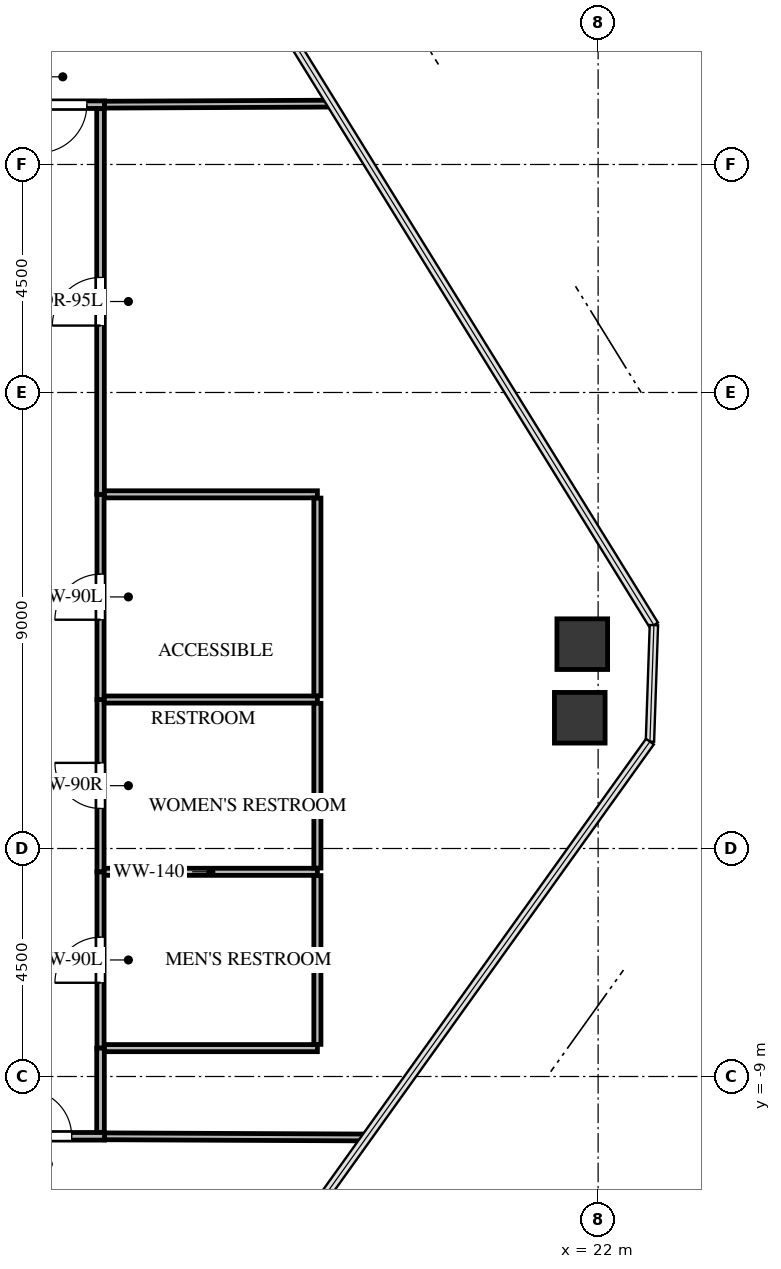
"""IFC4 building model, lengths in metres.
Left out: names, types, materials, properties, quantities, classifications, styles, units other than length and angle.
Written with IfcOpenShell. Run it as: python <this file> out.ifc"""

import sys

from ifc_helpers import new_model, si_unit, direction, frame, frame_2d, origin, origin_2d, place, context, subcontext, project, spatial, rectangle, extrude, source, transform, mapped, element, fill, save


model = new_model("IFC4")
c1 = context("Model", 3, precision=1e-05, world=origin(), true_north=direction((0.0, 1.0)))
c2 = subcontext(c1, "Body", "Model", "MODEL_VIEW")
j1 = project(units=[si_unit("LENGTHUNIT", "METRE"), si_unit("PLANEANGLEUNIT", "RADIAN")], contexts=[c1])
p1 = place(None, origin())
s1 = spatial("IfcSite", under=j1, at=p1, CompositionType="ELEMENT")
p2 = place(p1, origin())
s2 = spatial("IfcBuilding", under=s1, at=p2, CompositionType="ELEMENT")
p3 = place(p2, frame((0.0, 0.0, 177.1)))
s3 = spatial("IfcBuildingStorey", under=s2, at=p3, CompositionType="ELEMENT", Elevation=177.1)
m1 = source(origin(), c2, "Body", "SweptSolid", [
    extrude(rectangle(XDim=1.0, YDim=1.0, at=origin_2d()), origin(), (0.0, 0.0, 1.0), 3.3),
])
for number, where, z_axis, x_axis in (
    (1, (21.687, -0.467, -0.24), (0.0, 0.0, 1.0), (1.0, 0.0, 0.0)),
    (2, (21.638, -1.92, -0.24), (0.0, 0.0, 1.0), (1.0, 0.0, 0.0)),
):
    element("IfcColumn", number, at=place(p3, frame(where, z_axis=z_axis, x_axis=x_axis)), inside=s3, PredefinedType="COLUMN", context=c2, shape_type="MappedRepresentation", body=[
        mapped(m1, transform((0.0, 0.0, 0.0), x_axis=(1.0, 0.0, 0.0), y_axis=(0.0, 1.0, 0.0), z_axis=(0.0, 0.0, 1.0), scale=1.0)),
    ])
p4 = place(p3, frame((12.18, -8.44, 0.0), z_axis=(0.0, 0.0, 1.0), x_axis=(0.0, 1.0, 0.0)))
e3 = element("IfcWall", 3, at=p4, inside=s3, PredefinedType="PARTITIONING", context=c2, shape_type="SweptSolid", body=[
    extrude(rectangle(XDim=3.48, YDim=0.14, at=frame_2d((1.74, 0.0))), origin(), (0.0, 0.0, 1.0), 3.045),
])
p5 = place(p4, frame((1.29, 0.0, 0.0)))
e4 = element("IfcOpeningElement", 4, at=p5, cuts=e3, PredefinedType="OPENING", context=c2, shape_type="SweptSolid", body=[
    extrude(rectangle(XDim=0.9, YDim=2.05, at=frame_2d((0.45, 1.025))), frame((0.0, 0.08, 0.0), z_axis=(0.0, -1.0, 0.0), x_axis=(1.0, 0.0, 0.0)), (0.0, 0.0, 1.0), 0.16),
])
p6 = place(p3, frame((12.18, -4.96, 0.0), z_axis=(0.0, 0.0, 1.0), x_axis=(0.0, 1.0, 0.0)))
e5 = element("IfcWall", 5, at=p6, inside=s3, PredefinedType="PARTITIONING", context=c2, shape_type="SweptSolid", body=[
    extrude(rectangle(XDim=3.4, YDim=0.14, at=frame_2d((1.7, 0.0))), origin(), (0.0, 0.0, 1.0), 3.045),
])
p7 = place(p6, frame((1.25, 0.0, 0.0)))
e6 = element("IfcOpeningElement", 6, at=p7, cuts=e5, PredefinedType="OPENING", context=c2, shape_type="SweptSolid", body=[
    extrude(rectangle(XDim=0.9, YDim=2.05, at=frame_2d((0.45, 1.025))), frame((0.0, 0.08, 0.0), z_axis=(0.0, -1.0, 0.0), x_axis=(1.0, 0.0, 0.0)), (0.0, 0.0, 1.0), 0.16),
])
p8 = place(p3, frame((12.18, -1.56, 0.0), z_axis=(0.0, 0.0, 1.0), x_axis=(0.0, 1.0, 0.0)))
e7 = element("IfcWall", 7, at=p8, inside=s3, PredefinedType="PARTITIONING", context=c2, shape_type="SweptSolid", body=[
    extrude(rectangle(XDim=4.05, YDim=0.14, at=frame_2d((2.025, 0.0))), origin(), (0.0, 0.0, 1.0), 2.242),
])
p9 = place(p8, frame((1.575, 0.0, 0.0)))
e8 = element("IfcOpeningElement", 8, at=p9, cuts=e7, PredefinedType="OPENING", context=c2, shape_type="SweptSolid", body=[
    extrude(rectangle(XDim=0.9, YDim=2.05, at=frame_2d((0.45, 1.025))), frame((0.0, 0.08, 0.0), z_axis=(0.0, -1.0, 0.0), x_axis=(1.0, 0.0, 0.0)), (0.0, 0.0, 1.0), 0.16),
])
p10 = place(p3, frame((12.26, 10.18, 0.0), z_axis=(0.0, 0.0, 1.0), x_axis=(-1.0, 0.0, 0.0)))
e9 = element("IfcWall", 9, at=p10, inside=s3, PredefinedType="PARTITIONING", context=c2, shape_type="SweptSolid", body=[
    extrude(rectangle(XDim=3.72, YDim=0.15, at=frame_2d((1.86, 0.0))), origin(), (0.0, 0.0, 1.0), 2.242),
])
p11 = place(p10, frame((0.35, 0.0, 0.0)))
e10 = element("IfcOpeningElement", 10, at=p11, cuts=e9, PredefinedType="OPENING", context=c2, shape_type="SweptSolid", body=[
    extrude(rectangle(XDim=0.95, YDim=2.1, at=frame_2d((0.475, 1.05))), frame((0.0, 0.085, 0.0), z_axis=(0.0, -1.0, 0.0), x_axis=(1.0, 0.0, 0.0)), (0.0, 0.0, 1.0), 0.17),
])
p12 = place(p3, frame((10.04, -10.18, 0.0), z_axis=(0.0, 0.0, 1.0), x_axis=(1.0, 0.0, 0.0)))
e11 = element("IfcWall", 11, at=p12, inside=s3, PredefinedType="PARTITIONING", context=c2, shape_type="SweptSolid", body=[
    extrude(rectangle(XDim=2.22, YDim=0.15, at=frame_2d((1.11, 0.0))), origin(), (0.0, 0.0, 1.0), 3.045),
])
p13 = place(p12, frame((0.65, 0.0, 0.0)))
e12 = element("IfcOpeningElement", 12, at=p13, cuts=e11, PredefinedType="OPENING", context=c2, shape_type="SweptSolid", body=[
    extrude(rectangle(XDim=0.92, YDim=2.1, at=frame_2d((0.46, 1.05))), frame((0.0, 0.085, 0.0), z_axis=(0.0, -1.0, 0.0), x_axis=(1.0, 0.0, 0.0)), (0.0, 0.0, 1.0), 0.17),
])
p14 = place(p3, frame((12.18, 2.49, 0.0), z_axis=(0.0, 0.0, 1.0), x_axis=(0.0, 1.0, 0.0)))
e13 = element("IfcWall", 13, at=p14, inside=s3, PredefinedType="PARTITIONING", context=c2, shape_type="SweptSolid", body=[
    extrude(rectangle(XDim=7.611, YDim=0.15, at=frame_2d((3.806, 0.0))), origin(), (0.0, 0.0, 1.0), 3.045),
])
p15 = place(p14, frame((3.331, 0.0, 0.0)))
e14 = element("IfcOpeningElement", 14, at=p15, cuts=e13, PredefinedType="OPENING", context=c2, shape_type="SweptSolid", body=[
    extrude(rectangle(XDim=0.95, YDim=2.1, at=frame_2d((0.475, 1.05))), frame((0.0, 0.085, 0.0), z_axis=(0.0, -1.0, 0.0), x_axis=(1.0, 0.0, 0.0)), (0.0, 0.0, 1.0), 0.17),
])
p16 = place(p3, frame((12.18, -10.101, 0.0), z_axis=(0.0, 0.0, 1.0), x_axis=(0.0, 1.0, 0.0)))
e15 = element("IfcWall", 15, at=p16, inside=s3, PredefinedType="PARTITIONING", context=c2, shape_type="SweptSolid", body=[
    extrude(rectangle(XDim=1.661, YDim=0.15, at=frame_2d((0.831, 0.0))), origin(), (0.0, 0.0, 1.0), 3.045),
])
p17 = place(p3, frame((12.254, -4.96, 0.0), z_axis=(0.0, 0.0, 1.0), x_axis=(1.0, 0.0, 0.0)))
e16 = element("IfcWall", 16, at=p17, inside=s3, PredefinedType="PARTITIONING", context=c2, shape_type="SweptSolid", body=[
    extrude(rectangle(XDim=4.206, YDim=0.14, at=frame_2d((2.103, 0.0))), origin(), (0.0, 0.0, 1.0), 3.045),
])
p18 = place(p3, frame((16.46, -8.44, 0.0), z_axis=(0.0, 0.0, 1.0), x_axis=(-1.0, 0.0, 0.0)))
e17 = element("IfcWall", 17, at=p18, inside=s3, PredefinedType="PARTITIONING", context=c2, shape_type="SweptSolid", body=[
    extrude(rectangle(XDim=4.201, YDim=0.14, at=frame_2d((2.101, 0.0))), origin(), (0.0, 0.0, 1.0), 3.045),
])
p19 = place(p3, frame((16.46, -5.034, 0.0), z_axis=(0.0, 0.0, 1.0), x_axis=(0.0, -1.0, 0.0)))
e18 = element("IfcWall", 18, at=p19, inside=s3, PredefinedType="PARTITIONING", context=c2, shape_type="SweptSolid", body=[
    extrude(rectangle(XDim=3.332, YDim=0.14, at=frame_2d((1.666, 0.0))), origin(), (0.0, 0.0, 1.0), 3.045),
])
p20 = place(p3, frame((12.254, -1.56, 0.0), z_axis=(0.0, 0.0, 1.0), x_axis=(1.0, 0.0, 0.0)))
e19 = element("IfcWall", 19, at=p20, inside=s3, PredefinedType="PARTITIONING", context=c2, shape_type="SweptSolid", body=[
    extrude(rectangle(XDim=4.206, YDim=0.14, at=frame_2d((2.103, 0.0))), origin(), (0.0, 0.0, 1.0), 3.045),
])
p21 = place(p3, frame((16.46, -1.634, 0.0), z_axis=(0.0, 0.0, 1.0), x_axis=(0.0, -1.0, 0.0)))
e20 = element("IfcWall", 20, at=p21, inside=s3, PredefinedType="PARTITIONING", context=c2, shape_type="SweptSolid", body=[
    extrude(rectangle(XDim=3.252, YDim=0.14, at=frame_2d((1.626, 0.0))), origin(), (0.0, 0.0, 1.0), 3.045),
])
p22 = place(p3, frame((12.259, 2.49, 0.0), z_axis=(0.0, 0.0, 1.0), x_axis=(1.0, 0.0, 0.0)))
e21 = element("IfcWall", 21, at=p22, inside=s3, PredefinedType="PARTITIONING", context=c2, shape_type="SweptSolid", body=[
    extrude(rectangle(XDim=4.201, YDim=0.14, at=frame_2d((2.101, 0.0))), origin(), (0.0, 0.0, 1.0), 3.045),
])
p23 = place(p3, frame((16.46, 2.416, 0.0), z_axis=(0.0, 0.0, 1.0), x_axis=(0.0, -1.0, 0.0)))
e22 = element("IfcWall", 22, at=p23, inside=s3, PredefinedType="PARTITIONING", context=c2, shape_type="SweptSolid", body=[
    extrude(rectangle(XDim=3.902, YDim=0.14, at=frame_2d((1.951, 0.0))), origin(), (0.0, 0.0, 1.0), 2.242),
])
p24 = place(p3, frame((16.74, 10.201, 0.0), z_axis=(0.0, 0.0, 1.0), x_axis=(-0.999989522694, -0.004577608714, 0.0)))
e23 = element("IfcWall", 23, at=p24, inside=s3, PredefinedType="PARTITIONING", context=c2, shape_type="SweptSolid", body=[
    extrude(rectangle(XDim=4.48, YDim=0.135, at=frame_2d((2.24, 0.0))), origin(), (0.0, 0.0, 1.0), 2.399),
])
p25 = place(p3, frame((12.26, -10.18, 0.0), z_axis=(0.0, 0.0, 1.0), x_axis=(0.999990144117, -0.004439782427, 0.0)))
e24 = element("IfcWall", 24, at=p25, inside=s3, PredefinedType="PARTITIONING", context=c2, shape_type="SweptSolid", body=[
    extrude(rectangle(XDim=5.169, YDim=0.135, at=frame_2d((2.584, 0.0))), origin(), (0.0, 0.0, 1.0), 2.399),
])
m2 = source(origin(), c2, "Body", "SweptSolid", [
    extrude(rectangle(XDim=0.9, YDim=2.05, at=frame_2d((0.45, 1.025))), frame((0.0, 0.025, 0.0), z_axis=(0.0, -1.0, 0.0), x_axis=(1.0, 0.0, 0.0)), (0.0, 0.0, 1.0), 0.05),
])
p26 = place(p5, origin())
e25 = element("IfcDoor", 25, at=p26, inside=s3, OperationType="SINGLE_SWING_LEFT", PredefinedType="DOOR", context=c2, shape_type="MappedRepresentation", body=[
    mapped(m2, transform((0.0, 0.0, 0.0), x_axis=(1.0, 0.0, 0.0), y_axis=(0.0, 1.0, 0.0), z_axis=(0.0, 0.0, 1.0), scale=1.0)),
])
fill(e4, e25)
m3 = source(origin(), c2, "Body", "SweptSolid", [
    extrude(rectangle(XDim=0.9, YDim=2.05, at=frame_2d((0.45, 1.025))), frame((0.0, 0.025, 0.0), z_axis=(0.0, -1.0, 0.0), x_axis=(1.0, 0.0, 0.0)), (0.0, 0.0, 1.0), 0.05),
])
p27 = place(p7, origin())
e26 = element("IfcDoor", 26, at=p27, inside=s3, OperationType="SINGLE_SWING_RIGHT", PredefinedType="DOOR", context=c2, shape_type="MappedRepresentation", body=[
    mapped(m3, transform((0.0, 0.0, 0.0), x_axis=(1.0, 0.0, 0.0), y_axis=(0.0, 1.0, 0.0), z_axis=(0.0, 0.0, 1.0), scale=1.0)),
])
fill(e6, e26)
p28 = place(p9, origin())
e27 = element("IfcDoor", 27, at=p28, inside=s3, OperationType="SINGLE_SWING_LEFT", PredefinedType="DOOR", context=c2, shape_type="MappedRepresentation", body=[
    mapped(m2, transform((0.0, 0.0, 0.0), x_axis=(1.0, 0.0, 0.0), y_axis=(0.0, 1.0, 0.0), z_axis=(0.0, 0.0, 1.0), scale=1.0)),
])
fill(e8, e27)
m4 = source(origin(), c2, "Body", "SweptSolid", [
    extrude(rectangle(XDim=0.95, YDim=2.1, at=frame_2d((0.475, 1.05))), frame((0.0, 0.025, 0.0), z_axis=(0.0, -1.0, 0.0), x_axis=(1.0, 0.0, 0.0)), (0.0, 0.0, 1.0), 0.05),
])
p29 = place(p11, origin())
e28 = element("IfcDoor", 28, at=p29, inside=s3, OperationType="SINGLE_SWING_RIGHT", PredefinedType="DOOR", context=c2, shape_type="MappedRepresentation", body=[
    mapped(m4, transform((0.0, 0.0, 0.0), x_axis=(1.0, 0.0, 0.0), y_axis=(0.0, 1.0, 0.0), z_axis=(0.0, 0.0, 1.0), scale=1.0)),
])
fill(e10, e28)
m5 = source(origin(), c2, "Body", "SweptSolid", [
    extrude(rectangle(XDim=0.92, YDim=2.1, at=frame_2d((0.46, 1.05))), frame((0.0, 0.025, 0.0), z_axis=(0.0, -1.0, 0.0), x_axis=(1.0, 0.0, 0.0)), (0.0, 0.0, 1.0), 0.05),
])
p30 = place(p13, origin())
e29 = element("IfcDoor", 29, at=p30, inside=s3, OperationType="SINGLE_SWING_LEFT", PredefinedType="DOOR", context=c2, shape_type="MappedRepresentation", body=[
    mapped(m5, transform((0.0, 0.0, 0.0), x_axis=(1.0, 0.0, 0.0), y_axis=(0.0, 1.0, 0.0), z_axis=(0.0, 0.0, 1.0), scale=1.0)),
])
fill(e12, e29)
m6 = source(origin(), c2, "Body", "SweptSolid", [
    extrude(rectangle(XDim=0.95, YDim=2.1, at=frame_2d((0.475, 1.05))), frame((0.0, 0.025, 0.0), z_axis=(0.0, -1.0, 0.0), x_axis=(1.0, 0.0, 0.0)), (0.0, 0.0, 1.0), 0.05),
])
p31 = place(p15, origin())
e30 = element("IfcDoor", 30, at=p31, inside=s3, OperationType="SINGLE_SWING_LEFT", PredefinedType="DOOR", context=c2, shape_type="MappedRepresentation", body=[
    mapped(m6, transform((0.0, 0.0, 0.0), x_axis=(1.0, 0.0, 0.0), y_axis=(0.0, 1.0, 0.0), z_axis=(0.0, 0.0, 1.0), scale=1.0)),
])
fill(e14, e30)
save(model, sys.argv[1])
